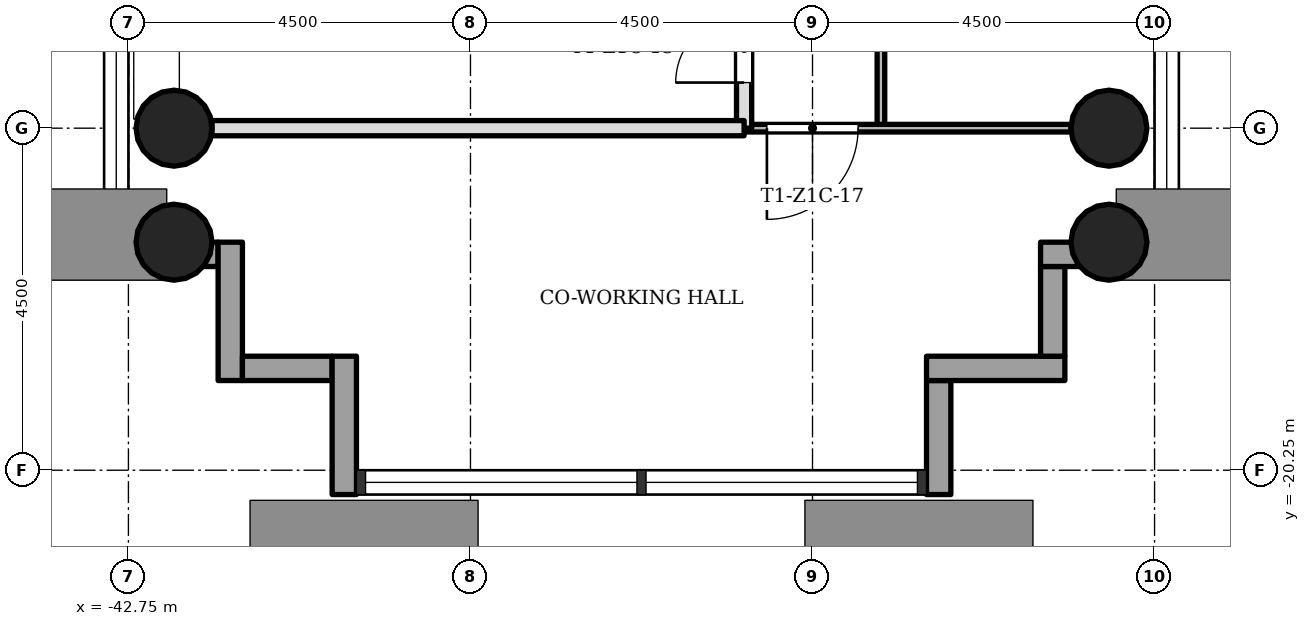
"""IFC4 building model, lengths in metres.
Left out: names, types, materials, properties, quantities, classifications, styles, units other than length and angle.
Written with IfcOpenShell. Run it as: python <this file> out.ifc"""

import sys

from ifc_helpers import new_model, si_unit, direction, frame, frame_2d, origin, origin_2d, place, context, subcontext, project, spatial, rectangle, hollow_circle, extrude, element, fill, save


model = new_model("IFC4")
c1 = context("Model", 3, precision=1e-05, world=origin(), true_north=direction((0.0, 1.0)))
c2 = subcontext(c1, "Body", "Model", "MODEL_VIEW")
j1 = project(units=[si_unit("LENGTHUNIT", "METRE"), si_unit("PLANEANGLEUNIT", "RADIAN")], contexts=[c1])
p1 = place(None, origin())
s1 = spatial("IfcSite", under=j1, at=p1, CompositionType="ELEMENT")
p2 = place(p1, origin())
s2 = spatial("IfcBuilding", under=s1, at=p2, CompositionType="ELEMENT")
p3 = place(p2, frame((0.0, 0.0, 51.7)))
s3 = spatial("IfcBuildingStorey", under=s2, at=p3, CompositionType="ELEMENT", Elevation=51.7)
for number, where, z_axis, x_axis in (
    (1, (-42.15, -15.75, 0.0), (0.0, 0.0, 1.0), (1.0, 0.0, 0.0)),
    (2, (-29.85, -15.75, 0.0), (0.0, 0.0, 1.0), (1.0, 0.0, 0.0)),
    (3, (-42.15, -17.25, 0.0), (0.0, 0.0, 1.0), (1.0, 0.0, 0.0)),
    (4, (-29.85, -17.25, 0.0), (0.0, 0.0, 1.0), (1.0, 0.0, 0.0)),
):
    element("IfcColumn", number, at=place(p3, frame(where, z_axis=z_axis, x_axis=x_axis)), inside=s3, PredefinedType="COLUMN", context=c2, shape_type="SweptSolid", body=[
        extrude(hollow_circle(Radius=0.5, WallThickness=0.036, at=origin_2d()), origin(), (0.0, 0.0, 1.0), 3.4),
    ])
p4 = place(p3, frame((-43.07, -17.41, -0.3), z_axis=(0.0, 0.0, 1.0), x_axis=(1.0, 0.0, 0.0)))
e5 = element("IfcWall", 5, at=p4, inside=s3, PredefinedType="STANDARD", context=c2, shape_type="SweptSolid", body=[
    extrude(rectangle(XDim=1.5, YDim=0.32, at=frame_2d((0.75, 0.0))), origin(), (0.0, 0.0, 1.0), 3.4),
])
p5 = place(p3, frame((-41.41, -17.25, -0.3), z_axis=(0.0, 0.0, 1.0), x_axis=(0.0, -1.0, 0.0)))
e6 = element("IfcWall", 6, at=p5, inside=s3, PredefinedType="STANDARD", context=c2, shape_type="SweptSolid", body=[
    extrude(rectangle(XDim=1.82, YDim=0.32, at=frame_2d((0.91, 0.0))), origin(), (0.0, 0.0, 1.0), 3.4),
])
p6 = place(p3, frame((-41.25, -18.91, -0.3), z_axis=(0.0, 0.0, 1.0), x_axis=(1.0, 0.0, 0.0)))
e7 = element("IfcWall", 7, at=p6, inside=s3, PredefinedType="STANDARD", context=c2, shape_type="SweptSolid", body=[
    extrude(rectangle(XDim=1.18, YDim=0.32, at=frame_2d((0.59, 0.0))), origin(), (0.0, 0.0, 1.0), 3.4),
])
p7 = place(p3, frame((-39.91, -18.75, -0.3), z_axis=(0.0, 0.0, 1.0), x_axis=(0.0, -1.0, 0.0)))
e8 = element("IfcWall", 8, at=p7, inside=s3, PredefinedType="STANDARD", context=c2, shape_type="SweptSolid", body=[
    extrude(rectangle(XDim=1.82, YDim=0.32, at=frame_2d((0.91, 0.0))), origin(), (0.0, 0.0, 1.0), 3.4),
])
p8 = place(p3, frame((-32.09, -20.57, -0.3), z_axis=(0.0, 0.0, 1.0), x_axis=(0.0, 1.0, 0.0)))
e9 = element("IfcWall", 9, at=p8, inside=s3, PredefinedType="STANDARD", context=c2, shape_type="SweptSolid", body=[
    extrude(rectangle(XDim=1.5, YDim=0.32, at=frame_2d((0.75, 0.0))), origin(), (0.0, 0.0, 1.0), 3.4),
])
p9 = place(p3, frame((-32.25, -18.91, -0.3), z_axis=(0.0, 0.0, 1.0), x_axis=(1.0, 0.0, 0.0)))
e10 = element("IfcWall", 10, at=p9, inside=s3, PredefinedType="STANDARD", context=c2, shape_type="SweptSolid", body=[
    extrude(rectangle(XDim=1.82, YDim=0.32, at=frame_2d((0.91, 0.0))), origin(), (0.0, 0.0, 1.0), 3.4),
])
p10 = place(p3, frame((-30.59, -18.75, -0.3), z_axis=(0.0, 0.0, 1.0), x_axis=(0.0, 1.0, 0.0)))
e11 = element("IfcWall", 11, at=p10, inside=s3, PredefinedType="STANDARD", context=c2, shape_type="SweptSolid", body=[
    extrude(rectangle(XDim=1.18, YDim=0.32, at=frame_2d((0.59, 0.0))), origin(), (0.0, 0.0, 1.0), 3.4),
])
p11 = place(p3, frame((-30.75, -17.41, -0.3), z_axis=(0.0, 0.0, 1.0), x_axis=(1.0, 0.0, 0.0)))
e12 = element("IfcWall", 12, at=p11, inside=s3, PredefinedType="STANDARD", context=c2, shape_type="SweptSolid", body=[
    extrude(rectangle(XDim=1.82, YDim=0.32, at=frame_2d((0.91, 0.0))), origin(), (0.0, 0.0, 1.0), 3.4),
])
p12 = place(p3, frame((-34.65, -15.75, 0.0), z_axis=(0.0, 0.0, 1.0), x_axis=(0.0, 1.0, 0.0)))
e13 = element("IfcWall", 13, at=p12, inside=s3, PredefinedType="SOLIDWALL", context=c2, shape_type="SweptSolid", body=[
    extrude(rectangle(XDim=4.5, YDim=0.2, at=frame_2d((2.25, 0.0))), origin(), (0.0, 0.0, 1.0), 3.0),
])
p13 = place(p12, frame((0.6, 0.0, 0.0)))
e14 = element("IfcOpeningElement", 14, at=p13, cuts=e13, PredefinedType="OPENING", context=c2, shape_type="SweptSolid", body=[
    extrude(rectangle(XDim=0.9, YDim=2.1, at=frame_2d((0.45, 1.05))), frame((0.0, 0.11, 0.0), z_axis=(0.0, -1.0, 0.0), x_axis=(1.0, 0.0, 0.0)), (0.0, 0.0, 1.0), 0.22),
])
p14 = place(p3, frame((-32.85, -15.75, 0.0), z_axis=(0.0, 0.0, 1.0), x_axis=(0.0, 1.0, 0.0)))
e15 = element("IfcWall", 15, at=p14, inside=s3, PredefinedType="PARTITIONING", context=c2, shape_type="SweptSolid", body=[
    extrude(rectangle(XDim=9.0, YDim=0.1, at=frame_2d((4.5, 0.0))), origin(), (0.0, 0.0, 1.0), 3.0),
])
p15 = place(p14, frame((6.3, 0.0, 0.0)))
e16 = element("IfcOpeningElement", 16, at=p15, cuts=e15, PredefinedType="OPENING", context=c2, shape_type="SweptSolid", body=[
    extrude(rectangle(XDim=0.9, YDim=2.1, at=frame_2d((0.45, 1.05))), frame((0.0, 0.06, 0.0), z_axis=(0.0, -1.0, 0.0), x_axis=(1.0, 0.0, 0.0)), (0.0, 0.0, 1.0), 0.12),
])
p16 = place(p14, frame((1.8, 0.0, 0.0)))
e17 = element("IfcOpeningElement", 17, at=p16, cuts=e15, PredefinedType="OPENING", context=c2, shape_type="SweptSolid", body=[
    extrude(rectangle(XDim=0.9, YDim=2.1, at=frame_2d((0.45, 1.05))), frame((0.0, 0.06, 0.0), z_axis=(0.0, -1.0, 0.0), x_axis=(1.0, 0.0, 0.0)), (0.0, 0.0, 1.0), 0.12),
])
p17 = place(p3, frame((-34.65, -15.75, 0.0), z_axis=(0.0, 0.0, 1.0), x_axis=(1.0, 0.0, 0.0)))
e18 = element("IfcWall", 18, at=p17, inside=s3, PredefinedType="PARTITIONING", context=c2, shape_type="SweptSolid", body=[
    extrude(rectangle(XDim=4.3, YDim=0.1, at=frame_2d((2.15, 0.0))), origin(), (0.0, 0.0, 1.0), 3.0),
])
p18 = place(p17, frame((0.3, 0.0, 0.0)))
e19 = element("IfcOpeningElement", 19, at=p18, cuts=e18, PredefinedType="OPENING", context=c2, shape_type="SweptSolid", body=[
    extrude(rectangle(XDim=1.2, YDim=2.1, at=frame_2d((0.6, 1.05))), frame((0.0, 0.06, 0.0), z_axis=(0.0, -1.0, 0.0), x_axis=(1.0, 0.0, 0.0)), (0.0, 0.0, 1.0), 0.12),
])
p19 = place(p3, frame((-41.65, -15.75, 0.0), z_axis=(0.0, 0.0, 1.0), x_axis=(1.0, 0.0, 0.0)))
e20 = element("IfcWall", 20, at=p19, inside=s3, PredefinedType="SOLIDWALL", context=c2, shape_type="SweptSolid", body=[
    extrude(rectangle(XDim=7.0, YDim=0.2, at=frame_2d((3.5, 0.0))), origin(), (0.0, 0.0, 1.0), 3.0),
])
p20 = place(p13, origin())
e21 = element("IfcDoor", 21, at=p20, inside=s3, OperationType="SINGLE_SWING_RIGHT", PredefinedType="DOOR", context=c2, shape_type="SweptSolid", body=[
    extrude(rectangle(XDim=0.9, YDim=2.1, at=frame_2d((0.45, 1.05))), frame((0.0, 0.025, 0.0), z_axis=(0.0, -1.0, 0.0), x_axis=(1.0, 0.0, 0.0)), (0.0, 0.0, 1.0), 0.05),
])
fill(e14, e21)
p21 = place(p18, origin())
e22 = element("IfcDoor", 22, at=p21, inside=s3, OperationType="SINGLE_SWING_LEFT", PredefinedType="DOOR", context=c2, shape_type="SweptSolid", body=[
    extrude(rectangle(XDim=1.2, YDim=2.1, at=frame_2d((0.6, 1.05))), frame((0.0, 0.025, 0.0), z_axis=(0.0, -1.0, 0.0), x_axis=(1.0, 0.0, 0.0)), (0.0, 0.0, 1.0), 0.05),
])
fill(e19, e22)
save(model, sys.argv[1])
